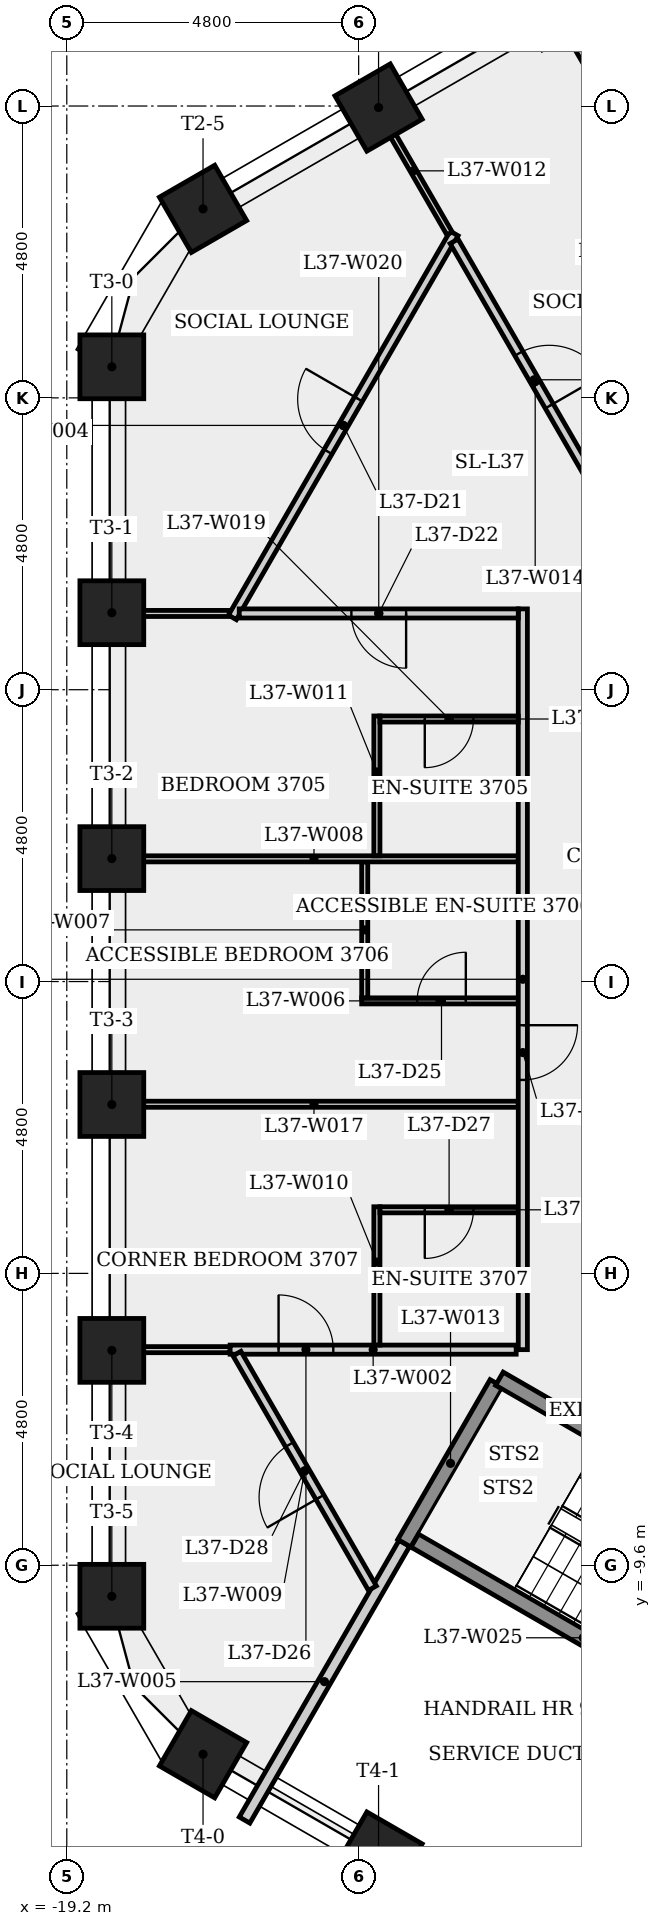
"""IFC4 building model, lengths in metres.
Left out: names, types, materials, properties, quantities, classifications, styles, units other than length and angle.
Written with IfcOpenShell. Run it as: python <this file> out.ifc"""

import sys

from ifc_helpers import new_model, si_unit, direction, frame, frame_2d, origin, origin_2d, place, context, subcontext, project, spatial, rectangle, extrude, element, fill, save


model = new_model("IFC4")
c1 = context("Model", 3, precision=1e-05, world=origin(), true_north=direction((0.0, 1.0)))
c2 = subcontext(c1, "Body", "Model", "MODEL_VIEW")
j1 = project(units=[si_unit("LENGTHUNIT", "METRE"), si_unit("PLANEANGLEUNIT", "RADIAN")], contexts=[c1])
p1 = place(None, origin())
s1 = spatial("IfcSite", under=j1, at=p1, CompositionType="ELEMENT")
p2 = place(p1, origin())
s2 = spatial("IfcBuilding", under=s1, at=p2, CompositionType="ELEMENT")
p3 = place(p2, frame((0.0, 0.0, 139.9)))
s3 = spatial("IfcBuildingStorey", under=s2, at=p3, CompositionType="ELEMENT", Elevation=139.9)
for number, where, z_axis, x_axis in (
    (1, (-14.073, 14.375, 0.0), (0.0, 0.0, 1.0), (-0.5, 0.866, 0.0)),
    (2, (-16.959, 12.708, 0.0), (0.0, 0.0, 1.0), (-0.5, 0.866, 0.0)),
    (3, (-18.459, 10.111, 0.0), (0.0, 0.0, 1.0), (-1.0, 0.0, 0.0)),
    (4, (-18.459, 6.066, 0.0), (0.0, 0.0, 1.0), (-1.0, 0.0, 0.0)),
    (5, (-18.459, 2.022, 0.0), (0.0, 0.0, 1.0), (-1.0, 0.0, 0.0)),
    (6, (-18.459, -2.022, 0.0), (0.0, 0.0, 1.0), (-1.0, 0.0, 0.0)),
    (7, (-18.459, -6.066, 0.0), (0.0, 0.0, 1.0), (-1.0, 0.0, 0.0)),
    (8, (-18.459, -10.111, 0.0), (0.0, 0.0, 1.0), (-1.0, 0.0, 0.0)),
    (9, (-16.959, -12.708, 0.0), (0.0, 0.0, 1.0), (-0.5, -0.866, 0.0)),
    (10, (-14.073, -14.375, 0.0), (0.0, 0.0, 1.0), (-0.5, -0.866, 0.0)),
):
    element("IfcColumn", number, at=place(p3, frame(where, z_axis=z_axis, x_axis=x_axis)), inside=s3, PredefinedType="COLUMN", context=c2, shape_type="SweptSolid", body=[
        extrude(rectangle(XDim=1.05, YDim=1.05, at=origin_2d()), origin(), (0.0, 0.0, 1.0), 4.0),
    ])
p4 = place(p3, frame((-16.514, -6.054, 0.0), z_axis=(0.0, 0.0, 1.0), x_axis=(-1.0, 0.0, 0.0)))
e11 = element("IfcWall", 11, at=p4, inside=s3, PredefinedType="PARTITIONING", context=c2, shape_type="SweptSolid", body=[
    extrude(rectangle(XDim=1.98, YDim=0.1, at=frame_2d((0.99, 0.0))), origin(), (0.0, 0.0, 1.0), 3.6),
])
p5 = place(p3, frame((-16.514, -6.054, 0.0), z_axis=(0.0, 0.0, 1.0), x_axis=(1.0, 0.0, 0.0)))
e12 = element("IfcWall", 12, at=p5, inside=s3, PredefinedType="PARTITIONING", context=c2, shape_type="SweptSolid", body=[
    extrude(rectangle(XDim=4.705, YDim=0.15, at=frame_2d((2.353, 0.0))), origin(), (0.0, 0.0, 1.0), 3.6),
])
p6 = place(p5, frame((0.797, 0.0, 0.0)))
e13 = element("IfcOpeningElement", 13, at=p6, cuts=e12, PredefinedType="OPENING", context=c2, shape_type="SweptSolid", body=[
    extrude(rectangle(XDim=0.9, YDim=2.1, at=frame_2d((0.45, 1.05))), frame((0.0, 0.085, 0.0), z_axis=(0.0, -1.0, 0.0), x_axis=(1.0, 0.0, 0.0)), (0.0, 0.0, 1.0), 0.17),
])
p7 = place(p3, frame((-16.514, 6.054, 0.0), z_axis=(0.0, 0.0, 1.0), x_axis=(-1.0, 0.0, 0.0)))
e14 = element("IfcWall", 14, at=p7, inside=s3, PredefinedType="PARTITIONING", context=c2, shape_type="SweptSolid", body=[
    extrude(rectangle(XDim=1.98, YDim=0.1, at=frame_2d((0.99, 0.0))), origin(), (0.0, 0.0, 1.0), 3.6),
])
p8 = place(p3, frame((-16.476, 5.989, 0.0), z_axis=(0.0, 0.0, 1.0), x_axis=(0.500002592159, 0.866023907196, 0.0)))
e15 = element("IfcWall", 15, at=p8, inside=s3, PredefinedType="PARTITIONING", context=c2, shape_type="SweptSolid", body=[
    extrude(rectangle(XDim=7.292, YDim=0.15, at=frame_2d((3.646, 0.0))), origin(), (0.0, 0.0, 1.0), 3.6),
])
p9 = place(p8, frame((3.146, 0.0, 0.0)))
e16 = element("IfcOpeningElement", 16, at=p9, cuts=e15, PredefinedType="OPENING", context=c2, shape_type="SweptSolid", body=[
    extrude(rectangle(XDim=1.0, YDim=2.1, at=frame_2d((0.5, 1.05))), frame((0.0, 0.085, 0.0), z_axis=(0.0, -1.0, 0.0), x_axis=(1.0, 0.0, 0.0)), (0.0, 0.0, 1.0), 0.17),
])
p10 = place(p3, frame((-16.276, -13.791, 0.0), z_axis=(0.0, 0.0, 1.0), x_axis=(0.499970375258, 0.866042506961, 0.0)))
e17 = element("IfcWall", 17, at=p10, inside=s3, PredefinedType="PLUMBINGWALL", context=c2, shape_type="SweptSolid", body=[
    extrude(rectangle(XDim=5.257, YDim=0.2, at=frame_2d((2.628, 0.0))), origin(), (0.0, 0.0, 1.0), 3.6),
])
p11 = place(p3, frame((-14.35, -0.318, 0.0), z_axis=(0.0, 0.0, 1.0), x_axis=(1.0, 0.0, 0.0)))
e18 = element("IfcWall", 18, at=p11, inside=s3, PredefinedType="PARTITIONING", context=c2, shape_type="SweptSolid", body=[
    extrude(rectangle(XDim=2.575, YDim=0.1, at=frame_2d((1.288, 0.0))), origin(), (0.0, 0.0, 1.0), 3.6),
])
p12 = place(p11, frame((0.913, 0.0, 0.0)))
e19 = element("IfcOpeningElement", 19, at=p12, cuts=e18, PredefinedType="OPENING", context=c2, shape_type="SweptSolid", body=[
    extrude(rectangle(XDim=0.8, YDim=2.1, at=frame_2d((0.4, 1.05))), frame((0.0, 0.06, 0.0), z_axis=(0.0, -1.0, 0.0), x_axis=(1.0, 0.0, 0.0)), (0.0, 0.0, 1.0), 0.12),
])
p13 = place(p3, frame((-14.3, 1.968, 0.0), z_axis=(0.0, 0.0, 1.0), x_axis=(0.0, -1.0, 0.0)))
e20 = element("IfcWall", 20, at=p13, inside=s3, PredefinedType="PARTITIONING", context=c2, shape_type="SweptSolid", body=[
    extrude(rectangle(XDim=2.236, YDim=0.1, at=frame_2d((1.118, 0.0))), origin(), (0.0, 0.0, 1.0), 3.6),
])
p14 = place(p3, frame((-18.494, 2.018, 0.0), z_axis=(0.0, 0.0, 1.0), x_axis=(1.0, 0.0, 0.0)))
e21 = element("IfcWall", 21, at=p14, inside=s3, PredefinedType="PARTITIONING", context=c2, shape_type="SweptSolid", body=[
    extrude(rectangle(XDim=6.719, YDim=0.1, at=frame_2d((3.36, 0.0))), origin(), (0.0, 0.0, 1.0), 3.6),
])
p15 = place(p3, frame((-14.174, -9.977, 0.0), z_axis=(0.0, 0.0, 1.0), x_axis=(-0.500011854745, 0.866018559336, 0.0)))
e22 = element("IfcWall", 22, at=p15, inside=s3, PredefinedType="PARTITIONING", context=c2, shape_type="SweptSolid", body=[
    extrude(rectangle(XDim=4.455, YDim=0.15, at=frame_2d((2.227, 0.0))), origin(), (0.0, 0.0, 1.0), 3.6),
])
p16 = place(p15, frame((1.727, 0.0, 0.0)))
e23 = element("IfcOpeningElement", 23, at=p16, cuts=e22, PredefinedType="OPENING", context=c2, shape_type="SweptSolid", body=[
    extrude(rectangle(XDim=1.0, YDim=2.1, at=frame_2d((0.5, 1.05))), frame((0.0, 0.085, 0.0), z_axis=(0.0, -1.0, 0.0), x_axis=(1.0, 0.0, 0.0)), (0.0, 0.0, 1.0), 0.17),
])
p17 = place(p3, frame((-14.1, -3.704, 0.0), z_axis=(0.0, 0.0, 1.0), x_axis=(0.0, -1.0, 0.0)))
e24 = element("IfcWall", 24, at=p17, inside=s3, PredefinedType="PARTITIONING", context=c2, shape_type="SweptSolid", body=[
    extrude(rectangle(XDim=2.275, YDim=0.1, at=frame_2d((1.138, 0.0))), origin(), (0.0, 0.0, 1.0), 3.6),
])
p18 = place(p3, frame((-14.1, 4.368, 0.0), z_axis=(0.0, 0.0, 1.0), x_axis=(0.0, -1.0, 0.0)))
e25 = element("IfcWall", 25, at=p18, inside=s3, PredefinedType="PARTITIONING", context=c2, shape_type="SweptSolid", body=[
    extrude(rectangle(XDim=2.3, YDim=0.1, at=frame_2d((1.15, 0.0))), origin(), (0.0, 0.0, 1.0), 3.6),
])
p19 = place(p3, frame((-14.094, 14.363, 0.0), z_axis=(0.0, 0.0, 1.0), x_axis=(0.500027724201, -0.866009396618, 0.0)))
e26 = element("IfcWall", 26, at=p19, inside=s3, PredefinedType="PARTITIONING", context=c2, shape_type="SweptSolid", body=[
    extrude(rectangle(XDim=2.377, YDim=0.1, at=frame_2d((1.188, 0.0))), origin(), (0.0, 0.0, 1.0), 3.6),
])
p20 = place(p3, frame((-13.648, -9.239, 0.0), z_axis=(0.0, 0.0, 1.0), x_axis=(0.50000556753, 0.866022189346, 0.0)))
e27 = element("IfcWall", 27, at=p20, inside=s3, PredefinedType="SHEAR", context=c2, shape_type="SweptSolid", body=[
    extrude(rectangle(XDim=3.036, YDim=0.25, at=frame_2d((1.518, 0.0))), origin(), (0.0, 0.0, 1.0), 3.6),
])
p21 = place(p3, frame((-12.83, 12.175, 0.0), z_axis=(0.0, 0.0, 1.0), x_axis=(0.49998396455, -0.866034661658, 0.0)))
e28 = element("IfcWall", 28, at=p21, inside=s3, PredefinedType="PARTITIONING", context=c2, shape_type="SweptSolid", body=[
    extrude(rectangle(XDim=5.334, YDim=0.15, at=frame_2d((2.667, 0.0))), origin(), (0.0, 0.0, 1.0), 3.6),
])
p22 = place(p21, frame((2.129, 0.0, 0.0)))
e29 = element("IfcOpeningElement", 29, at=p22, cuts=e28, PredefinedType="OPENING", context=c2, shape_type="SweptSolid", body=[
    extrude(rectangle(XDim=1.0, YDim=2.1, at=frame_2d((0.5, 1.05))), frame((0.0, 0.085, 0.0), z_axis=(0.0, -1.0, 0.0), x_axis=(1.0, 0.0, 0.0)), (0.0, 0.0, 1.0), 0.17),
])
p23 = place(p3, frame((-12.085, -6.532, 0.0), z_axis=(0.0, 0.0, 1.0), x_axis=(0.86604373436, -0.499968249168, 0.0)))
e30 = element("IfcWall", 30, at=p23, inside=s3, PredefinedType="SHEAR", context=c2, shape_type="SweptSolid", body=[
    extrude(rectangle(XDim=1.118, YDim=0.25, at=frame_2d((0.559, 0.0))), origin(), (0.0, 0.0, 1.0), 3.6),
])
p24 = place(p3, frame((-11.775, -3.754, 0.0), z_axis=(0.0, 0.0, 1.0), x_axis=(-1.0, 0.0, 0.0)))
e31 = element("IfcWall", 31, at=p24, inside=s3, PredefinedType="PARTITIONING", context=c2, shape_type="SweptSolid", body=[
    extrude(rectangle(XDim=2.275, YDim=0.1, at=frame_2d((1.138, 0.0))), origin(), (0.0, 0.0, 1.0), 3.6),
])
p25 = place(p24, frame((0.738, 0.0, 0.0)))
e32 = element("IfcOpeningElement", 32, at=p25, cuts=e31, PredefinedType="OPENING", context=c2, shape_type="SweptSolid", body=[
    extrude(rectangle(XDim=0.8, YDim=2.1, at=frame_2d((0.4, 1.05))), frame((0.0, 0.06, 0.0), z_axis=(0.0, -1.0, 0.0), x_axis=(1.0, 0.0, 0.0)), (0.0, 0.0, 1.0), 0.12),
])
p26 = place(p3, frame((-11.775, -2.018, 0.0), z_axis=(0.0, 0.0, 1.0), x_axis=(-1.0, 0.0, 0.0)))
e33 = element("IfcWall", 33, at=p26, inside=s3, PredefinedType="PARTITIONING", context=c2, shape_type="SweptSolid", body=[
    extrude(rectangle(XDim=6.719, YDim=0.1, at=frame_2d((3.36, 0.0))), origin(), (0.0, 0.0, 1.0), 3.6),
])
p27 = place(p3, frame((-11.7, 6.129, 0.0), z_axis=(0.0, 0.0, 1.0), x_axis=(0.0, -1.0, 0.0)))
e34 = element("IfcWall", 34, at=p27, inside=s3, PredefinedType="PARTITIONING", context=c2, shape_type="SweptSolid", body=[
    extrude(rectangle(XDim=12.183, YDim=0.15, at=frame_2d((6.092, 0.0))), origin(), (0.0, 0.0, 1.0), 3.6),
])
p28 = place(p27, frame((6.847, 0.0, 0.0)))
e35 = element("IfcOpeningElement", 35, at=p28, cuts=e34, PredefinedType="OPENING", context=c2, shape_type="SweptSolid", body=[
    extrude(rectangle(XDim=0.9, YDim=2.1, at=frame_2d((0.45, 1.05))), frame((0.0, 0.085, 0.0), z_axis=(0.0, -1.0, 0.0), x_axis=(1.0, 0.0, 0.0)), (0.0, 0.0, 1.0), 0.17),
])
p29 = place(p3, frame((-11.775, 4.318, 0.0), z_axis=(0.0, 0.0, 1.0), x_axis=(-1.0, 0.0, 0.0)))
e36 = element("IfcWall", 36, at=p29, inside=s3, PredefinedType="PARTITIONING", context=c2, shape_type="SweptSolid", body=[
    extrude(rectangle(XDim=2.275, YDim=0.1, at=frame_2d((1.138, 0.0))), origin(), (0.0, 0.0, 1.0), 3.6),
])
p30 = place(p29, frame((0.738, 0.0, 0.0)))
e37 = element("IfcOpeningElement", 37, at=p30, cuts=e36, PredefinedType="OPENING", context=c2, shape_type="SweptSolid", body=[
    extrude(rectangle(XDim=0.8, YDim=2.1, at=frame_2d((0.4, 1.05))), frame((0.0, 0.06, 0.0), z_axis=(0.0, -1.0, 0.0), x_axis=(1.0, 0.0, 0.0)), (0.0, 0.0, 1.0), 0.12),
])
p31 = place(p3, frame((-11.775, 6.054, 0.0), z_axis=(0.0, 0.0, 1.0), x_axis=(-1.0, 0.0, 0.0)))
e38 = element("IfcWall", 38, at=p31, inside=s3, PredefinedType="PARTITIONING", context=c2, shape_type="SweptSolid", body=[
    extrude(rectangle(XDim=4.589, YDim=0.15, at=frame_2d((2.294, 0.0))), origin(), (0.0, 0.0, 1.0), 3.6),
])
p32 = place(p31, frame((1.844, 0.0, 0.0)))
e39 = element("IfcOpeningElement", 39, at=p32, cuts=e38, PredefinedType="OPENING", context=c2, shape_type="SweptSolid", body=[
    extrude(rectangle(XDim=0.9, YDim=2.1, at=frame_2d((0.45, 1.05))), frame((0.0, 0.085, 0.0), z_axis=(0.0, -1.0, 0.0), x_axis=(1.0, 0.0, 0.0)), (0.0, 0.0, 1.0), 0.17),
])
p33 = place(p3, frame((-11.1, -7.101, 0.0), z_axis=(0.0, 0.0, 1.0), x_axis=(0.866028615007, -0.499994437958, 0.0)))
e40 = element("IfcWall", 40, at=p33, inside=s3, PredefinedType="SHEAR", context=c2, shape_type="SweptSolid", body=[
    extrude(rectangle(XDim=5.387, YDim=0.25, at=frame_2d((2.694, 0.0))), origin(), (0.0, 0.0, 1.0), 3.6),
])
p34 = place(p33, frame((4.012, 0.0, 0.0)))
e41 = element("IfcOpeningElement", 41, at=p34, cuts=e40, PredefinedType="OPENING", context=c2, shape_type="SweptSolid", body=[
    extrude(rectangle(XDim=1.0, YDim=2.1, at=frame_2d((0.5, 1.05))), frame((0.0, 0.135, 0.0), z_axis=(0.0, -1.0, 0.0), x_axis=(1.0, 0.0, 0.0)), (0.0, 0.0, 1.0), 0.27),
])
p35 = place(p3, frame((-7.935, -12.393, 0.0), z_axis=(0.0, 0.0, 1.0), x_axis=(-0.866025499775, 0.499999833739, 0.0)))
e42 = element("IfcWall", 42, at=p35, inside=s3, PredefinedType="SHEAR", context=c2, shape_type="SweptSolid", body=[
    extrude(rectangle(XDim=6.4, YDim=0.25, at=frame_2d((3.2, 0.0))), origin(), (0.0, 0.0, 1.0), 3.6),
])
p36 = place(p3, frame((-7.338, 9.36, 0.0), z_axis=(0.0, 0.0, 1.0), x_axis=(-0.499997453958, 0.866026873738, 0.0)))
e43 = element("IfcWall", 43, at=p36, inside=s3, PredefinedType="PARTITIONING", context=c2, shape_type="SweptSolid", body=[
    extrude(rectangle(XDim=7.71, YDim=0.1, at=frame_2d((3.855, 0.0))), origin(), (0.0, 0.0, 1.0), 3.6),
])
p37 = place(p9, origin())
e44 = element("IfcDoor", 44, at=p37, inside=s3, OperationType="SINGLE_SWING_RIGHT", PredefinedType="DOOR", context=c2, shape_type="SweptSolid", body=[
    extrude(rectangle(XDim=1.0, YDim=2.1, at=frame_2d((0.5, 1.05))), frame((0.0, 0.025, 0.0), z_axis=(0.0, -1.0, 0.0), x_axis=(1.0, 0.0, 0.0)), (0.0, 0.0, 1.0), 0.05),
])
fill(e16, e44)
p38 = place(p32, origin())
e45 = element("IfcDoor", 45, at=p38, inside=s3, OperationType="SINGLE_SWING_LEFT", PredefinedType="DOOR", context=c2, shape_type="SweptSolid", body=[
    extrude(rectangle(XDim=0.9, YDim=2.1, at=frame_2d((0.45, 1.05))), frame((0.0, 0.025, 0.0), z_axis=(0.0, -1.0, 0.0), x_axis=(1.0, 0.0, 0.0)), (0.0, 0.0, 1.0), 0.05),
])
fill(e39, e45)
p39 = place(p30, origin())
e46 = element("IfcDoor", 46, at=p39, inside=s3, OperationType="SINGLE_SWING_RIGHT", PredefinedType="DOOR", context=c2, shape_type="SweptSolid", body=[
    extrude(rectangle(XDim=0.8, YDim=2.1, at=frame_2d((0.4, 1.05))), frame((0.0, 0.025, 0.0), z_axis=(0.0, -1.0, 0.0), x_axis=(1.0, 0.0, 0.0)), (0.0, 0.0, 1.0), 0.05),
])
fill(e37, e46)
p40 = place(p28, origin())
e47 = element("IfcDoor", 47, at=p40, inside=s3, OperationType="SINGLE_SWING_LEFT", PredefinedType="DOOR", context=c2, shape_type="SweptSolid", body=[
    extrude(rectangle(XDim=0.9, YDim=2.1, at=frame_2d((0.45, 1.05))), frame((0.0, 0.025, 0.0), z_axis=(0.0, -1.0, 0.0), x_axis=(1.0, 0.0, 0.0)), (0.0, 0.0, 1.0), 0.05),
])
fill(e35, e47)
p41 = place(p12, origin())
e48 = element("IfcDoor", 48, at=p41, inside=s3, OperationType="SINGLE_SWING_RIGHT", PredefinedType="DOOR", context=c2, shape_type="SweptSolid", body=[
    extrude(rectangle(XDim=0.8, YDim=2.1, at=frame_2d((0.4, 1.05))), frame((0.0, 0.025, 0.0), z_axis=(0.0, -1.0, 0.0), x_axis=(1.0, 0.0, 0.0)), (0.0, 0.0, 1.0), 0.05),
])
fill(e19, e48)
p42 = place(p6, origin())
e49 = element("IfcDoor", 49, at=p42, inside=s3, OperationType="SINGLE_SWING_LEFT", PredefinedType="DOOR", context=c2, shape_type="SweptSolid", body=[
    extrude(rectangle(XDim=0.9, YDim=2.1, at=frame_2d((0.45, 1.05))), frame((0.0, 0.025, 0.0), z_axis=(0.0, -1.0, 0.0), x_axis=(1.0, 0.0, 0.0)), (0.0, 0.0, 1.0), 0.05),
])
fill(e13, e49)
p43 = place(p25, origin())
e50 = element("IfcDoor", 50, at=p43, inside=s3, OperationType="SINGLE_SWING_RIGHT", PredefinedType="DOOR", context=c2, shape_type="SweptSolid", body=[
    extrude(rectangle(XDim=0.8, YDim=2.1, at=frame_2d((0.4, 1.05))), frame((0.0, 0.025, 0.0), z_axis=(0.0, -1.0, 0.0), x_axis=(1.0, 0.0, 0.0)), (0.0, 0.0, 1.0), 0.05),
])
fill(e32, e50)
p44 = place(p16, origin())
e51 = element("IfcDoor", 51, at=p44, inside=s3, OperationType="SINGLE_SWING_LEFT", PredefinedType="DOOR", context=c2, shape_type="SweptSolid", body=[
    extrude(rectangle(XDim=1.0, YDim=2.1, at=frame_2d((0.5, 1.05))), frame((0.0, 0.025, 0.0), z_axis=(0.0, -1.0, 0.0), x_axis=(1.0, 0.0, 0.0)), (0.0, 0.0, 1.0), 0.05),
])
fill(e23, e51)
p45 = place(p22, origin())
e52 = element("IfcDoor", 52, at=p45, inside=s3, OperationType="SINGLE_SWING_RIGHT", PredefinedType="DOOR", context=c2, shape_type="SweptSolid", body=[
    extrude(rectangle(XDim=1.0, YDim=2.1, at=frame_2d((0.5, 1.05))), frame((0.0, 0.025, 0.0), z_axis=(0.0, -1.0, 0.0), x_axis=(1.0, 0.0, 0.0)), (0.0, 0.0, 1.0), 0.05),
])
fill(e29, e52)
save(model, sys.argv[1])
